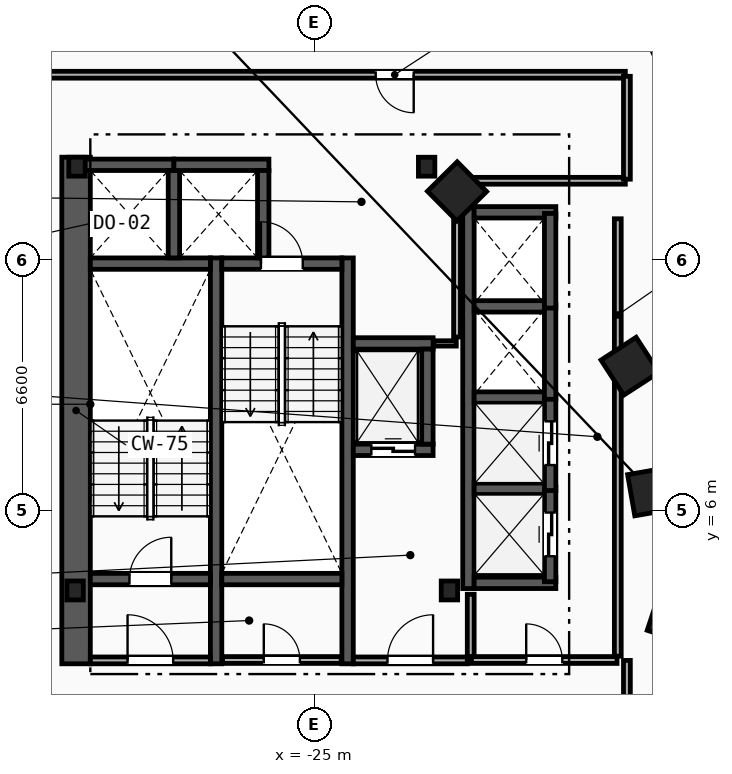
"""IFC4 building model, lengths in metres.
Left out: names, types, materials, properties, quantities, classifications, styles, units other than length and angle.
Written with IfcOpenShell. Run it as: python <this file> out.ifc"""

import sys

from ifc_helpers import new_model, si_unit, direction, frame, frame_2d, origin, origin_2d, place, context, subcontext, project, spatial, rectangle, i_section, extrude, element, fill, save


model = new_model("IFC4")
c1 = context("Model", 3, precision=1e-05, world=origin(), true_north=direction((0.0, 1.0)))
c2 = subcontext(c1, "Body", "Model", "MODEL_VIEW")
j1 = project(units=[si_unit("LENGTHUNIT", "METRE"), si_unit("PLANEANGLEUNIT", "RADIAN")], contexts=[c1])
p1 = place(None, origin())
s1 = spatial("IfcSite", under=j1, at=p1, CompositionType="ELEMENT")
p2 = place(p1, origin())
s2 = spatial("IfcBuilding", under=s1, at=p2, CompositionType="ELEMENT")
p3 = place(p2, frame((0.0, 0.0, 89.0)))
s3 = spatial("IfcBuildingStorey", under=s2, at=p3, CompositionType="ELEMENT", Elevation=89.0)
for number, where, z_axis, x_axis in (
    (1, (-31.3, 3.9, 0.0), (0.0, 0.0, 1.0), (1.0, 0.0, 0.0)),
    (2, (-21.45, 3.9, 0.0), (0.0, 0.0, 1.0), (1.0, 0.0, 0.0)),
    (3, (-22.05, 15.05, 0.0), (0.0, 0.0, 1.0), (1.0, 0.0, 0.0)),
    (4, (-31.25, 15.05, 0.0), (0.0, 0.0, 1.0), (1.0, 0.0, 0.0)),
):
    element("IfcColumn", number, at=place(p3, frame(where, z_axis=z_axis, x_axis=x_axis)), inside=s3, PredefinedType="COLUMN", context=c2, shape_type="SweptSolid", body=[
        extrude(i_section(OverallWidth=0.432, OverallDepth=0.498, WebThickness=0.056, FlangeThickness=0.089, FilletRadius=0.018, at=origin_2d()), origin(), (0.0, 0.0, 1.0), 3.6),
    ])
for number, where, z_axis, x_axis in (
    (5, (-15.55, 3.2, 0.0), (0.0, 0.0, 1.0), (0.315, 0.949, 0.0)),
    (6, (-16.125, 6.5, 0.0), (0.0, 0.0, 1.0), (-0.172, 0.985, 0.0)),
    (7, (-16.7, 9.8, 0.0), (0.0, 0.0, 1.0), (-0.544, 0.839, 0.0)),
    (8, (-21.25, 14.4, 0.0), (0.0, 0.0, 1.0), (-0.703, 0.711, 0.0)),
):
    element("IfcColumn", number, at=place(p3, frame(where, z_axis=z_axis, x_axis=x_axis)), inside=s3, PredefinedType="COLUMN", context=c2, shape_type="SweptSolid", body=[
        extrude(rectangle(XDim=1.1, YDim=1.1, at=origin_2d()), origin(), (0.0, 0.0, 1.0), 3.6),
    ])
p4 = place(p3, frame((-31.275, 1.97, 0.0), z_axis=(0.0, 0.0, 1.0), x_axis=(0.0, 1.0, 0.0)))
e9 = element("IfcWall", 9, at=p4, inside=s3, PredefinedType="SHEAR", context=c2, shape_type="SweptSolid", body=[
    extrude(rectangle(XDim=13.33, YDim=0.75, at=frame_2d((6.665, 0.0))), origin(), (0.0, 0.0, 1.0), 3.3),
])
for number, where, z_axis, x_axis in (
    (10, (-27.59, 1.97, 0.0), (0.0, 0.0, 1.0), (0.0, 1.0, 0.0)),
    (11, (-24.13, 1.97, 0.0), (0.0, 0.0, 1.0), (0.0, 1.0, 0.0)),
):
    element("IfcWall", number, at=place(p3, frame(where, z_axis=z_axis, x_axis=x_axis)), inside=s3, PredefinedType="SHEAR", context=c2, shape_type="SweptSolid", body=[
        extrude(rectangle(XDim=10.68, YDim=0.3, at=frame_2d((5.34, 0.0))), origin(), (0.0, 0.0, 1.0), 3.3),
    ])
p5 = place(p3, frame((-30.9, 4.2, 0.0), z_axis=(0.0, 0.0, 1.0), x_axis=(1.0, 0.0, 0.0)))
e12 = element("IfcWall", 12, at=p5, inside=s3, PredefinedType="SHEAR", context=c2, shape_type="SweptSolid", body=[
    extrude(rectangle(XDim=3.16, YDim=0.3, at=frame_2d((1.58, 0.0))), origin(), (0.0, 0.0, 1.0), 3.3),
])
p6 = place(p5, frame((1.03, 0.0, 0.0)))
e13 = element("IfcOpeningElement", 13, at=p6, cuts=e12, PredefinedType="OPENING", context=c2, shape_type="SweptSolid", body=[
    extrude(rectangle(XDim=1.1, YDim=2.15, at=frame_2d((0.55, 1.075))), frame((0.0, 0.16, 0.0), z_axis=(0.0, -1.0, 0.0), x_axis=(1.0, 0.0, 0.0)), (0.0, 0.0, 1.0), 0.32),
])
p7 = place(p3, frame((-30.9, 12.5, 0.0), z_axis=(0.0, 0.0, 1.0), x_axis=(1.0, 0.0, 0.0)))
e14 = element("IfcWall", 14, at=p7, inside=s3, PredefinedType="SHEAR", context=c2, shape_type="SweptSolid", body=[
    extrude(rectangle(XDim=3.16, YDim=0.3, at=frame_2d((1.58, 0.0))), origin(), (0.0, 0.0, 1.0), 3.3),
])
p8 = place(p3, frame((-27.44, 12.5, 0.0), z_axis=(0.0, 0.0, 1.0), x_axis=(1.0, 0.0, 0.0)))
e15 = element("IfcWall", 15, at=p8, inside=s3, PredefinedType="SHEAR", context=c2, shape_type="SweptSolid", body=[
    extrude(rectangle(XDim=3.16, YDim=0.3, at=frame_2d((1.58, 0.0))), origin(), (0.0, 0.0, 1.0), 3.3),
])
p9 = place(p8, frame((1.03, 0.0, 0.0)))
e16 = element("IfcOpeningElement", 16, at=p9, cuts=e15, PredefinedType="OPENING", context=c2, shape_type="SweptSolid", body=[
    extrude(rectangle(XDim=1.1, YDim=2.15, at=frame_2d((0.55, 1.075))), frame((0.0, 0.16, 0.0), z_axis=(0.0, -1.0, 0.0), x_axis=(1.0, 0.0, 0.0)), (0.0, 0.0, 1.0), 0.32),
])
p10 = place(p3, frame((-27.44, 4.2, 0.0), z_axis=(0.0, 0.0, 1.0), x_axis=(1.0, 0.0, 0.0)))
e17 = element("IfcWall", 17, at=p10, inside=s3, PredefinedType="SHEAR", context=c2, shape_type="SweptSolid", body=[
    extrude(rectangle(XDim=3.16, YDim=0.3, at=frame_2d((1.58, 0.0))), origin(), (0.0, 0.0, 1.0), 3.3),
])
p11 = place(p3, frame((-20.89, 2.15, 0.0), z_axis=(0.0, 0.0, 1.0), x_axis=(0.0, 1.0, 0.0)))
e18 = element("IfcWall", 18, at=p11, inside=s3, PredefinedType="PARTITIONING", context=c2, shape_type="SweptSolid", body=[
    extrude(rectangle(XDim=1.65, YDim=0.18, at=frame_2d((0.825, 0.0))), origin(), (0.0, 0.0, 1.0), 3.3),
])
p12 = place(p3, frame((-23.98, 2.06, 0.0), z_axis=(0.0, 0.0, 1.0), x_axis=(1.0, 0.0, 0.0)))
e19 = element("IfcWall", 19, at=p12, inside=s3, PredefinedType="PARTITIONING", context=c2, shape_type="SweptSolid", body=[
    extrude(rectangle(XDim=3.0, YDim=0.18, at=frame_2d((1.5, 0.0))), origin(), (0.0, 0.0, 1.0), 3.3),
])
p13 = place(p12, frame((0.9, 0.0, 0.0)))
e20 = element("IfcOpeningElement", 20, at=p13, cuts=e19, PredefinedType="OPENING", context=c2, shape_type="SweptSolid", body=[
    extrude(rectangle(XDim=1.2, YDim=2.15, at=frame_2d((0.6, 1.075))), frame((0.0, 0.1, 0.0), z_axis=(0.0, -1.0, 0.0), x_axis=(1.0, 0.0, 0.0)), (0.0, 0.0, 1.0), 0.2),
])
p14 = place(p3, frame((-30.9, 2.06, 0.0), z_axis=(0.0, 0.0, 1.0), x_axis=(1.0, 0.0, 0.0)))
e21 = element("IfcWall", 21, at=p14, inside=s3, PredefinedType="PARTITIONING", context=c2, shape_type="SweptSolid", body=[
    extrude(rectangle(XDim=3.16, YDim=0.18, at=frame_2d((1.58, 0.0))), origin(), (0.0, 0.0, 1.0), 3.3),
])
p15 = place(p14, frame((0.98, 0.0, 0.0)))
e22 = element("IfcOpeningElement", 22, at=p15, cuts=e21, PredefinedType="OPENING", context=c2, shape_type="SweptSolid", body=[
    extrude(rectangle(XDim=1.2, YDim=2.15, at=frame_2d((0.6, 1.075))), frame((0.0, 0.1, 0.0), z_axis=(0.0, -1.0, 0.0), x_axis=(1.0, 0.0, 0.0)), (0.0, 0.0, 1.0), 0.2),
])
p16 = place(p3, frame((-23.98, 7.6, 0.0), z_axis=(0.0, 0.0, 1.0), x_axis=(1.0, 0.0, 0.0)))
e23 = element("IfcWall", 23, at=p16, inside=s3, PredefinedType="SHEAR", context=c2, shape_type="SweptSolid", body=[
    extrude(rectangle(XDim=2.1, YDim=0.3, at=frame_2d((1.05, 0.0))), origin(), (0.0, 0.0, 1.0), 3.3),
])
p17 = place(p16, frame((0.475, 0.0, 0.0)))
e24 = element("IfcOpeningElement", 24, at=p17, cuts=e23, PredefinedType="OPENING", context=c2, shape_type="SweptSolid", body=[
    extrude(rectangle(XDim=1.15, YDim=2.2, at=frame_2d((0.575, 1.1))), frame((0.0, 0.16, 0.0), z_axis=(0.0, -1.0, 0.0), x_axis=(1.0, 0.0, 0.0)), (0.0, 0.0, 1.0), 0.32),
])
p18 = place(p3, frame((-23.98, 10.4, 0.0), z_axis=(0.0, 0.0, 1.0), x_axis=(1.0, 0.0, 0.0)))
e25 = element("IfcWall", 25, at=p18, inside=s3, PredefinedType="SHEAR", context=c2, shape_type="SweptSolid", body=[
    extrude(rectangle(XDim=2.1, YDim=0.3, at=frame_2d((1.05, 0.0))), origin(), (0.0, 0.0, 1.0), 3.3),
])
for number, where, z_axis, x_axis in (
    (26, (-22.03, 7.75, 0.0), (0.0, 0.0, 1.0), (0.0, 1.0, 0.0)),
    (27, (-31.2, 15.1, 0.0), (0.0, 0.0, 1.0), (1.0, 0.0, 0.0)),
):
    element("IfcWall", number, at=place(p3, frame(where, z_axis=z_axis, x_axis=x_axis)), inside=s3, PredefinedType="SHEAR", context=c2, shape_type="SweptSolid", body=[
        extrude(rectangle(XDim=2.5, YDim=0.3, at=frame_2d((1.25, 0.0))), origin(), (0.0, 0.0, 1.0), 3.3),
    ])
p19 = place(p3, frame((-28.7, 12.65, 0.0), z_axis=(0.0, 0.0, 1.0), x_axis=(0.0, 1.0, 0.0)))
e28 = element("IfcWall", 28, at=p19, inside=s3, PredefinedType="SHEAR", context=c2, shape_type="SweptSolid", body=[
    extrude(rectangle(XDim=2.3, YDim=0.3, at=frame_2d((1.15, 0.0))), origin(), (0.0, 0.0, 1.0), 3.3),
])
p20 = place(p3, frame((-28.7, 15.1, 0.0), z_axis=(0.0, 0.0, 1.0), x_axis=(1.0, 0.0, 0.0)))
e29 = element("IfcWall", 29, at=p20, inside=s3, PredefinedType="SHEAR", context=c2, shape_type="SweptSolid", body=[
    extrude(rectangle(XDim=2.5, YDim=0.3, at=frame_2d((1.25, 0.0))), origin(), (0.0, 0.0, 1.0), 3.3),
])
p21 = place(p3, frame((-26.35, 12.65, 0.0), z_axis=(0.0, 0.0, 1.0), x_axis=(0.0, 1.0, 0.0)))
e30 = element("IfcWall", 30, at=p21, inside=s3, PredefinedType="SHEAR", context=c2, shape_type="SweptSolid", body=[
    extrude(rectangle(XDim=2.3, YDim=0.3, at=frame_2d((1.15, 0.0))), origin(), (0.0, 0.0, 1.0), 3.3),
])
p22 = place(p3, frame((-20.95, 3.95, 0.0), z_axis=(0.0, 0.0, 1.0), x_axis=(0.0, 1.0, 0.0)))
e31 = element("IfcWall", 31, at=p22, inside=s3, PredefinedType="SHEAR", context=c2, shape_type="SweptSolid", body=[
    extrude(rectangle(XDim=10.05, YDim=0.3, at=frame_2d((5.025, 0.0))), origin(), (0.0, 0.0, 1.0), 3.3),
])
for number, where, z_axis, x_axis in (
    (32, (-20.8, 4.1, 0.0), (0.0, 0.0, 1.0), (1.0, 0.0, 0.0)),
    (33, (-20.8, 13.85, 0.0), (0.0, 0.0, 1.0), (1.0, 0.0, 0.0)),
):
    element("IfcWall", number, at=place(p3, frame(where, z_axis=z_axis, x_axis=x_axis)), inside=s3, PredefinedType="SHEAR", context=c2, shape_type="SweptSolid", body=[
        extrude(rectangle(XDim=2.15, YDim=0.3, at=frame_2d((1.075, 0.0))), origin(), (0.0, 0.0, 1.0), 3.3),
    ])
for number, where, z_axis, x_axis in (
    (34, (-20.8, 6.575, 0.0), (0.0, 0.0, 1.0), (1.0, 0.0, 0.0)),
    (35, (-20.8, 8.975, 0.0), (0.0, 0.0, 1.0), (1.0, 0.0, 0.0)),
    (36, (-20.8, 11.375, 0.0), (0.0, 0.0, 1.0), (1.0, 0.0, 0.0)),
):
    element("IfcWall", number, at=place(p3, frame(where, z_axis=z_axis, x_axis=x_axis)), inside=s3, PredefinedType="SHEAR", context=c2, shape_type="SweptSolid", body=[
        extrude(rectangle(XDim=1.85, YDim=0.3, at=frame_2d((0.925, 0.0))), origin(), (0.0, 0.0, 1.0), 3.3),
    ])
p23 = place(p3, frame((-18.8, 4.13, 0.0), z_axis=(0.0, 0.0, 1.0), x_axis=(0.0, 1.0, 0.0)))
e37 = element("IfcWall", 37, at=p23, inside=s3, PredefinedType="SHEAR", context=c2, shape_type="SweptSolid", body=[
    extrude(rectangle(XDim=2.49, YDim=0.3, at=frame_2d((1.245, 0.0))), origin(), (0.0, 0.0, 1.0), 3.3),
])
p24 = place(p23, frame((0.67, 0.0, 0.0)))
e38 = element("IfcOpeningElement", 38, at=p24, cuts=e37, PredefinedType="OPENING", context=c2, shape_type="SweptSolid", body=[
    extrude(rectangle(XDim=1.15, YDim=2.2, at=frame_2d((0.575, 1.1))), frame((0.0, 0.16, 0.0), z_axis=(0.0, -1.0, 0.0), x_axis=(1.0, 0.0, 0.0)), (0.0, 0.0, 1.0), 0.32),
])
p25 = place(p3, frame((-18.8, 6.53, 0.0), z_axis=(0.0, 0.0, 1.0), x_axis=(0.0, 1.0, 0.0)))
e39 = element("IfcWall", 39, at=p25, inside=s3, PredefinedType="SHEAR", context=c2, shape_type="SweptSolid", body=[
    extrude(rectangle(XDim=2.49, YDim=0.3, at=frame_2d((1.245, 0.0))), origin(), (0.0, 0.0, 1.0), 3.3),
])
p26 = place(p25, frame((0.67, 0.0, 0.0)))
e40 = element("IfcOpeningElement", 40, at=p26, cuts=e39, PredefinedType="OPENING", context=c2, shape_type="SweptSolid", body=[
    extrude(rectangle(XDim=1.15, YDim=2.2, at=frame_2d((0.575, 1.1))), frame((0.0, 0.16, 0.0), z_axis=(0.0, -1.0, 0.0), x_axis=(1.0, 0.0, 0.0)), (0.0, 0.0, 1.0), 0.32),
])
for number, where, z_axis, x_axis in (
    (41, (-18.8, 8.93, 0.0), (0.0, 0.0, 1.0), (0.0, 1.0, 0.0)),
    (42, (-18.8, 11.33, 0.0), (0.0, 0.0, 1.0), (0.0, 1.0, 0.0)),
):
    element("IfcWall", number, at=place(p3, frame(where, z_axis=z_axis, x_axis=x_axis)), inside=s3, PredefinedType="SHEAR", context=c2, shape_type="SweptSolid", body=[
        extrude(rectangle(XDim=2.49, YDim=0.3, at=frame_2d((1.245, 0.0))), origin(), (0.0, 0.0, 1.0), 3.3),
    ])
p27 = place(p3, frame((-17.02, 2.17, 0.0), z_axis=(0.0, 0.0, 1.0), x_axis=(0.0, 1.0, 0.0)))
e43 = element("IfcWall", 43, at=p27, inside=s3, PredefinedType="PARTITIONING", context=c2, shape_type="SweptSolid", body=[
    extrude(rectangle(XDim=11.51, YDim=0.18, at=frame_2d((5.755, 0.0))), origin(), (0.0, 0.0, 1.0), 3.3),
])
p28 = place(p3, frame((-20.87, 2.07, 0.0), z_axis=(0.0, 0.0, 1.0), x_axis=(1.0, 0.0, 0.0)))
e44 = element("IfcWall", 44, at=p28, inside=s3, PredefinedType="PARTITIONING", context=c2, shape_type="SweptSolid", body=[
    extrude(rectangle(XDim=3.83, YDim=0.18, at=frame_2d((1.915, 0.0))), origin(), (0.0, 0.0, 1.0), 3.3),
])
p29 = place(p28, frame((1.44, 0.0, 0.0)))
e45 = element("IfcOpeningElement", 45, at=p29, cuts=e44, PredefinedType="OPENING", context=c2, shape_type="SweptSolid", body=[
    extrude(rectangle(XDim=0.95, YDim=2.1, at=frame_2d((0.475, 1.05))), frame((0.0, 0.1, 0.0), z_axis=(0.0, -1.0, 0.0), x_axis=(1.0, 0.0, 0.0)), (0.0, 0.0, 1.0), 0.2),
])
p30 = place(p3, frame((-21.86, 10.4, 0.0), z_axis=(0.0, 0.0, 1.0), x_axis=(1.0, 0.0, 0.0)))
e46 = element("IfcWall", 46, at=p30, inside=s3, PredefinedType="PARTITIONING", context=c2, shape_type="SweptSolid", body=[
    extrude(rectangle(XDim=0.59, YDim=0.14, at=frame_2d((0.295, 0.0))), origin(), (0.0, 0.0, 1.0), 3.3),
])
p31 = place(p3, frame((-21.25, 10.57, 0.0), z_axis=(0.0, 0.0, 1.0), x_axis=(0.0, 1.0, 0.0)))
e47 = element("IfcWall", 47, at=p31, inside=s3, PredefinedType="PARTITIONING", context=c2, shape_type="SweptSolid", body=[
    extrude(rectangle(XDim=4.36, YDim=0.18, at=frame_2d((2.18, 0.0))), origin(), (0.0, 0.0, 1.0), 3.3),
])
p32 = place(p3, frame((-27.42, 2.07, 0.0), z_axis=(0.0, 0.0, 1.0), x_axis=(1.0, 0.0, 0.0)))
e48 = element("IfcWall", 48, at=p32, inside=s3, PredefinedType="PARTITIONING", context=c2, shape_type="SweptSolid", body=[
    extrude(rectangle(XDim=3.12, YDim=0.18, at=frame_2d((1.56, 0.0))), origin(), (0.0, 0.0, 1.0), 3.3),
])
p33 = place(p32, frame((1.085, 0.0, 0.0)))
e49 = element("IfcOpeningElement", 49, at=p33, cuts=e48, PredefinedType="OPENING", context=c2, shape_type="SweptSolid", body=[
    extrude(rectangle(XDim=0.95, YDim=2.1, at=frame_2d((0.475, 1.05))), frame((0.0, 0.1, 0.0), z_axis=(0.0, -1.0, 0.0), x_axis=(1.0, 0.0, 0.0)), (0.0, 0.0, 1.0), 0.2),
])
p34 = place(p3, frame((-16.822, 17.47, 0.0), z_axis=(0.0, 0.0, 1.0), x_axis=(-1.0, 0.0, 0.0)))
e50 = element("IfcWall", 50, at=p34, inside=s3, PredefinedType="PARTITIONING", context=c2, shape_type="SweptSolid", body=[
    extrude(rectangle(XDim=16.807, YDim=0.18, at=frame_2d((8.403, 0.0))), origin(), (0.0, 0.0, 1.0), 3.3),
])
p35 = place(p34, frame((5.569, 0.0, 0.0)))
e51 = element("IfcOpeningElement", 51, at=p35, cuts=e50, PredefinedType="OPENING", context=c2, shape_type="SweptSolid", body=[
    extrude(rectangle(XDim=1.0, YDim=2.15, at=frame_2d((0.5, 1.075))), frame((0.0, 0.1, 0.0), z_axis=(0.0, -1.0, 0.0), x_axis=(1.0, 0.0, 0.0)), (0.0, 0.0, 1.0), 0.2),
])
p36 = place(p3, frame((-21.178, 14.68, 0.0), z_axis=(0.0, 0.0, 1.0), x_axis=(1.0, 0.0, 0.0)))
e52 = element("IfcWall", 52, at=p36, inside=s3, PredefinedType="PARTITIONING", context=c2, shape_type="SweptSolid", body=[
    extrude(rectangle(XDim=4.357, YDim=0.18, at=frame_2d((2.178, 0.0))), origin(), (0.0, 0.0, 1.0), 3.3),
])
p37 = place(p3, frame((-16.78, 14.721, 0.0), z_axis=(0.0, 0.0, 1.0), x_axis=(0.0, 1.0, 0.0)))
e53 = element("IfcWall", 53, at=p37, inside=s3, PredefinedType="PARTITIONING", context=c2, shape_type="SweptSolid", body=[
    extrude(rectangle(XDim=2.707, YDim=0.18, at=frame_2d((1.354, 0.0))), origin(), (0.0, 0.0, 1.0), 3.3),
])
p38 = place(p3, frame((-16.78, -0.329, 0.0), z_axis=(0.0, 0.0, 1.0), x_axis=(0.0, 1.0, 0.0)))
e54 = element("IfcWall", 54, at=p38, inside=s3, PredefinedType="PARTITIONING", context=c2, shape_type="SweptSolid", body=[
    extrude(rectangle(XDim=2.387, YDim=0.18, at=frame_2d((1.194, 0.0))), origin(), (0.0, 0.0, 1.0), 3.3),
])
p39 = place(p6, origin())
e55 = element("IfcDoor", 55, at=p39, inside=s3, OperationType="SINGLE_SWING_RIGHT", PredefinedType="DOOR", context=c2, shape_type="SweptSolid", body=[
    extrude(rectangle(XDim=1.1, YDim=2.15, at=frame_2d((0.55, 1.075))), frame((0.0, 0.025, 0.0), z_axis=(0.0, -1.0, 0.0), x_axis=(1.0, 0.0, 0.0)), (0.0, 0.0, 1.0), 0.05),
])
fill(e13, e55)
p40 = place(p9, origin())
e56 = element("IfcDoor", 56, at=p40, inside=s3, OperationType="SINGLE_SWING_LEFT", PredefinedType="DOOR", context=c2, shape_type="SweptSolid", body=[
    extrude(rectangle(XDim=1.1, YDim=2.15, at=frame_2d((0.55, 1.075))), frame((0.0, 0.025, 0.0), z_axis=(0.0, -1.0, 0.0), x_axis=(1.0, 0.0, 0.0)), (0.0, 0.0, 1.0), 0.05),
])
fill(e16, e56)
p41 = place(p13, origin())
e57 = element("IfcDoor", 57, at=p41, inside=s3, OperationType="SINGLE_SWING_RIGHT", PredefinedType="DOOR", context=c2, shape_type="SweptSolid", body=[
    extrude(rectangle(XDim=1.2, YDim=2.15, at=frame_2d((0.6, 1.075))), frame((0.0, 0.025, 0.0), z_axis=(0.0, -1.0, 0.0), x_axis=(1.0, 0.0, 0.0)), (0.0, 0.0, 1.0), 0.05),
])
fill(e20, e57)
p42 = place(p15, origin())
e58 = element("IfcDoor", 58, at=p42, inside=s3, OperationType="SINGLE_SWING_LEFT", PredefinedType="DOOR", context=c2, shape_type="SweptSolid", body=[
    extrude(rectangle(XDim=1.2, YDim=2.15, at=frame_2d((0.6, 1.075))), frame((0.0, 0.025, 0.0), z_axis=(0.0, -1.0, 0.0), x_axis=(1.0, 0.0, 0.0)), (0.0, 0.0, 1.0), 0.05),
])
fill(e22, e58)
p43 = place(p17, origin())
e59 = element("IfcDoor", 59, at=p43, inside=s3, OperationType="SLIDING_TO_LEFT", PredefinedType="TRAPDOOR", context=c2, shape_type="SweptSolid", body=[
    extrude(rectangle(XDim=1.15, YDim=2.2, at=frame_2d((0.575, 1.1))), frame((0.0, 0.025, 0.0), z_axis=(0.0, -1.0, 0.0), x_axis=(1.0, 0.0, 0.0)), (0.0, 0.0, 1.0), 0.05),
])
fill(e24, e59)
p44 = place(p24, origin())
e60 = element("IfcDoor", 60, at=p44, inside=s3, OperationType="SLIDING_TO_LEFT", PredefinedType="TRAPDOOR", context=c2, shape_type="SweptSolid", body=[
    extrude(rectangle(XDim=1.15, YDim=2.2, at=frame_2d((0.575, 1.1))), frame((0.0, 0.025, 0.0), z_axis=(0.0, -1.0, 0.0), x_axis=(1.0, 0.0, 0.0)), (0.0, 0.0, 1.0), 0.05),
])
fill(e38, e60)
p45 = place(p26, origin())
e61 = element("IfcDoor", 61, at=p45, inside=s3, OperationType="SLIDING_TO_LEFT", PredefinedType="TRAPDOOR", context=c2, shape_type="SweptSolid", body=[
    extrude(rectangle(XDim=1.15, YDim=2.2, at=frame_2d((0.575, 1.1))), frame((0.0, 0.025, 0.0), z_axis=(0.0, -1.0, 0.0), x_axis=(1.0, 0.0, 0.0)), (0.0, 0.0, 1.0), 0.05),
])
fill(e40, e61)
p46 = place(p35, origin())
e62 = element("IfcDoor", 62, at=p46, inside=s3, OperationType="SINGLE_SWING_LEFT", PredefinedType="DOOR", context=c2, shape_type="SweptSolid", body=[
    extrude(rectangle(XDim=1.0, YDim=2.15, at=frame_2d((0.5, 1.075))), frame((0.0, 0.025, 0.0), z_axis=(0.0, -1.0, 0.0), x_axis=(1.0, 0.0, 0.0)), (0.0, 0.0, 1.0), 0.05),
])
fill(e51, e62)
p47 = place(p29, origin())
e63 = element("IfcDoor", 63, at=p47, inside=s3, OperationType="SINGLE_SWING_LEFT", PredefinedType="DOOR", context=c2, shape_type="SweptSolid", body=[
    extrude(rectangle(XDim=0.95, YDim=2.1, at=frame_2d((0.475, 1.05))), frame((0.0, 0.025, 0.0), z_axis=(0.0, -1.0, 0.0), x_axis=(1.0, 0.0, 0.0)), (0.0, 0.0, 1.0), 0.05),
])
fill(e45, e63)
p48 = place(p33, origin())
e64 = element("IfcDoor", 64, at=p48, inside=s3, OperationType="SINGLE_SWING_LEFT", PredefinedType="DOOR", context=c2, shape_type="SweptSolid", body=[
    extrude(rectangle(XDim=0.95, YDim=2.1, at=frame_2d((0.475, 1.05))), frame((0.0, 0.025, 0.0), z_axis=(0.0, -1.0, 0.0), x_axis=(1.0, 0.0, 0.0)), (0.0, 0.0, 1.0), 0.05),
])
fill(e49, e64)
save(model, sys.argv[1])
